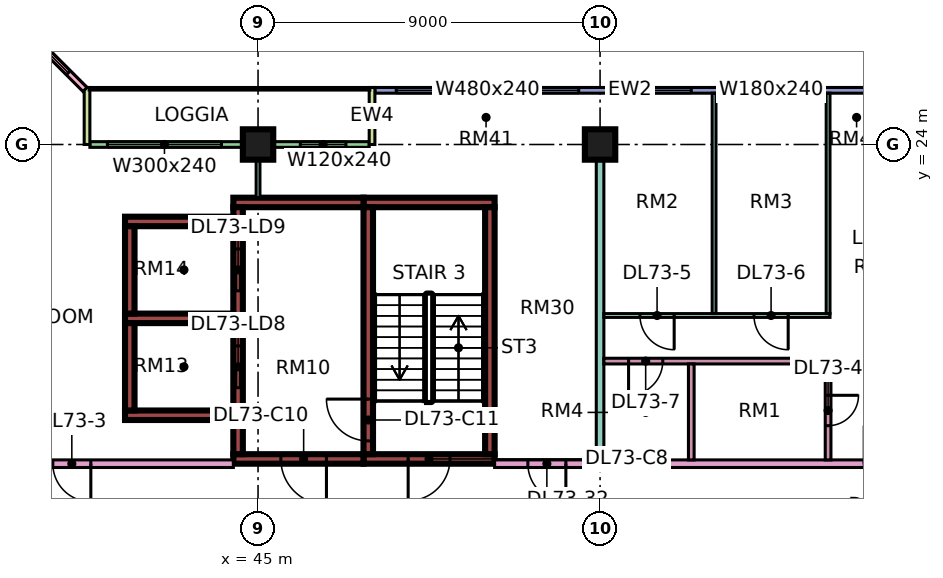
"""IFC4 building model, lengths in metres.
Left out: names, types, materials, properties, quantities, classifications, styles, units other than length and angle.
Written with IfcOpenShell. Run it as: python <this file> out.ifc"""

import sys

from ifc_helpers import new_model, si_unit, direction, frame, frame_2d, origin, origin_2d, place, context, subcontext, project, spatial, rectangle, extrude, element, fill, save


model = new_model("IFC4")
c1 = context("Model", 3, precision=1e-05, world=origin(), true_north=direction((0.0, 1.0)))
c2 = subcontext(c1, "Body", "Model", "MODEL_VIEW")
j1 = project(units=[si_unit("LENGTHUNIT", "METRE"), si_unit("PLANEANGLEUNIT", "RADIAN")], contexts=[c1])
p1 = place(None, origin())
s1 = spatial("IfcSite", under=j1, at=p1, CompositionType="ELEMENT")
p2 = place(p1, origin())
s2 = spatial("IfcBuilding", under=s1, at=p2, CompositionType="ELEMENT")
p3 = place(p2, frame((0.0, 0.0, 310.9)))
s3 = spatial("IfcBuildingStorey", under=s2, at=p3, CompositionType="ELEMENT", Elevation=310.9)
for number, where, z_axis, x_axis in (
    (1, (45.0, 24.0, 0.0), (0.0, 0.0, 1.0), (1.0, 0.0, 0.0)),
    (2, (54.0, 24.0, 0.0), (0.0, 0.0, 1.0), (1.0, 0.0, 0.0)),
):
    element("IfcColumn", number, at=place(p3, frame(where, z_axis=z_axis, x_axis=x_axis)), inside=s3, PredefinedType="COLUMN", context=c2, shape_type="SweptSolid", body=[
        extrude(rectangle(XDim=0.8, YDim=0.8, at=origin_2d()), origin(), (0.0, 0.0, 1.0), 3.75),
    ])
p4 = place(p3, frame((47.775, 15.725, 0.0), z_axis=(0.0, 0.0, 1.0), x_axis=(1.0, 0.0, 0.0)))
e3 = element("IfcWall", 3, at=p4, inside=s3, PredefinedType="SHEAR", context=c2, shape_type="SweptSolid", body=[
    extrude(rectangle(XDim=3.45, YDim=0.25, at=frame_2d((1.725, 0.0))), origin(), (0.0, 0.0, 1.0), 3.75),
])
p5 = place(p4, frame((1.175, 0.0, 0.0)))
e4 = element("IfcOpeningElement", 4, at=p5, cuts=e3, PredefinedType="OPENING", context=c2, shape_type="SweptSolid", body=[
    extrude(rectangle(XDim=1.1, YDim=2.2, at=frame_2d((0.55, 1.1))), frame((0.0, 0.135, 0.0), z_axis=(0.0, -1.0, 0.0), x_axis=(1.0, 0.0, 0.0)), (0.0, 0.0, 1.0), 0.27),
])
p6 = place(p3, frame((47.775, 22.475, 0.0), z_axis=(0.0, 0.0, 1.0), x_axis=(1.0, 0.0, 0.0)))
e5 = element("IfcWall", 5, at=p6, inside=s3, PredefinedType="SHEAR", context=c2, shape_type="SweptSolid", body=[
    extrude(rectangle(XDim=3.45, YDim=0.25, at=frame_2d((1.725, 0.0))), origin(), (0.0, 0.0, 1.0), 3.75),
])
p7 = place(p3, frame((47.9, 15.85, 0.0), z_axis=(0.0, 0.0, 1.0), x_axis=(0.0, 1.0, 0.0)))
e6 = element("IfcWall", 6, at=p7, inside=s3, PredefinedType="SHEAR", context=c2, shape_type="SweptSolid", body=[
    extrude(rectangle(XDim=6.5, YDim=0.25, at=frame_2d((3.25, 0.0))), origin(), (0.0, 0.0, 1.0), 3.75),
])
p8 = place(p7, frame((0.35, 0.0, 0.0)))
e7 = element("IfcOpeningElement", 7, at=p8, cuts=e6, PredefinedType="OPENING", context=c2, shape_type="SweptSolid", body=[
    extrude(rectangle(XDim=1.1, YDim=2.2, at=frame_2d((0.55, 1.1))), frame((0.0, 0.135, 0.0), z_axis=(0.0, -1.0, 0.0), x_axis=(1.0, 0.0, 0.0)), (0.0, 0.0, 1.0), 0.27),
])
p9 = place(p3, frame((51.1, 15.85, 0.0), z_axis=(0.0, 0.0, 1.0), x_axis=(0.0, 1.0, 0.0)))
e8 = element("IfcWall", 8, at=p9, inside=s3, PredefinedType="SHEAR", context=c2, shape_type="SweptSolid", body=[
    extrude(rectangle(XDim=6.5, YDim=0.25, at=frame_2d((3.25, 0.0))), origin(), (0.0, 0.0, 1.0), 3.75),
])
p10 = place(p3, frame((44.35, 15.725, 0.0), z_axis=(0.0, 0.0, 1.0), x_axis=(1.0, 0.0, 0.0)))
e9 = element("IfcWall", 9, at=p10, inside=s3, PredefinedType="SHEAR", context=c2, shape_type="SweptSolid", body=[
    extrude(rectangle(XDim=3.425, YDim=0.25, at=frame_2d((1.712, 0.0))), origin(), (0.0, 0.0, 1.0), 3.75),
])
p11 = place(p10, frame((1.25, 0.0, 0.0)))
e10 = element("IfcOpeningElement", 10, at=p11, cuts=e9, PredefinedType="OPENING", context=c2, shape_type="SweptSolid", body=[
    extrude(rectangle(XDim=1.2, YDim=2.2, at=frame_2d((0.6, 1.1))), frame((0.0, 0.135, 0.0), z_axis=(0.0, -1.0, 0.0), x_axis=(1.0, 0.0, 0.0)), (0.0, 0.0, 1.0), 0.27),
])
p12 = place(p3, frame((44.35, 22.475, 0.0), z_axis=(0.0, 0.0, 1.0), x_axis=(1.0, 0.0, 0.0)))
e11 = element("IfcWall", 11, at=p12, inside=s3, PredefinedType="SHEAR", context=c2, shape_type="SweptSolid", body=[
    extrude(rectangle(XDim=3.425, YDim=0.25, at=frame_2d((1.712, 0.0))), origin(), (0.0, 0.0, 1.0), 3.75),
])
p13 = place(p3, frame((44.475, 15.85, 0.0), z_axis=(0.0, 0.0, 1.0), x_axis=(0.0, 1.0, 0.0)))
e12 = element("IfcWall", 12, at=p13, inside=s3, PredefinedType="SHEAR", context=c2, shape_type="SweptSolid", body=[
    extrude(rectangle(XDim=6.5, YDim=0.25, at=frame_2d((3.25, 0.0))), origin(), (0.0, 0.0, 1.0), 3.75),
])
p14 = place(p13, frame((1.75, 0.0, 0.0)))
e13 = element("IfcOpeningElement", 13, at=p14, cuts=e12, PredefinedType="OPENING", context=c2, shape_type="SweptSolid", body=[
    extrude(rectangle(XDim=1.1, YDim=2.2, at=frame_2d((0.55, 1.1))), frame((0.0, 0.135, 0.0), z_axis=(0.0, -1.0, 0.0), x_axis=(1.0, 0.0, 0.0)), (0.0, 0.0, 1.0), 0.27),
])
p15 = place(p13, frame((4.3, 0.0, 0.0)))
e14 = element("IfcOpeningElement", 14, at=p15, cuts=e12, PredefinedType="OPENING", context=c2, shape_type="SweptSolid", body=[
    extrude(rectangle(XDim=1.1, YDim=2.2, at=frame_2d((0.55, 1.1))), frame((0.0, 0.135, 0.0), z_axis=(0.0, -1.0, 0.0), x_axis=(1.0, 0.0, 0.0)), (0.0, 0.0, 1.0), 0.27),
])
for number, where, z_axis, x_axis in (
    (15, (41.5, 16.875, 0.0), (0.0, 0.0, 1.0), (1.0, 0.0, 0.0)),
    (16, (41.5, 19.425, 0.0), (0.0, 0.0, 1.0), (1.0, 0.0, 0.0)),
    (17, (41.5, 21.975, 0.0), (0.0, 0.0, 1.0), (1.0, 0.0, 0.0)),
):
    element("IfcWall", number, at=place(p3, frame(where, z_axis=z_axis, x_axis=x_axis)), inside=s3, PredefinedType="SHEAR", context=c2, shape_type="SweptSolid", body=[
        extrude(rectangle(XDim=2.85, YDim=0.25, at=frame_2d((1.425, 0.0))), origin(), (0.0, 0.0, 1.0), 3.75),
    ])
for number, where, z_axis, x_axis in (
    (18, (41.625, 17.0, 0.0), (0.0, 0.0, 1.0), (0.0, 1.0, 0.0)),
    (19, (41.625, 19.55, 0.0), (0.0, 0.0, 1.0), (0.0, 1.0, 0.0)),
):
    element("IfcWall", number, at=place(p3, frame(where, z_axis=z_axis, x_axis=x_axis)), inside=s3, PredefinedType="SHEAR", context=c2, shape_type="SweptSolid", body=[
        extrude(rectangle(XDim=2.3, YDim=0.25, at=frame_2d((1.15, 0.0))), origin(), (0.0, 0.0, 1.0), 3.75),
    ])
p16 = place(p3, frame((61.5, 25.425, 0.0), z_axis=(0.0, 0.0, 1.0), x_axis=(-1.0, 0.0, 0.0)))
e20 = element("IfcWall", 20, at=p16, inside=s3, PredefinedType="SOLIDWALL", context=c2, shape_type="SweptSolid", body=[
    extrude(rectangle(XDim=13.425, YDim=0.15, at=frame_2d((6.712, 0.0))), origin(), (0.0, 0.0, 1.0), 3.35),
])
p17 = place(p16, frame((2.1, 0.0, 0.45)))
e21 = element("IfcOpeningElement", 21, at=p17, cuts=e20, PredefinedType="OPENING", context=c2, shape_type="SweptSolid", body=[
    extrude(rectangle(XDim=1.8, YDim=2.4, at=frame_2d((0.9, 1.2))), frame((0.0, 0.085, 0.0), z_axis=(0.0, -1.0, 0.0), x_axis=(1.0, 0.0, 0.0)), (0.0, 0.0, 1.0), 0.17),
])
p18 = place(p16, frame((5.1, 0.0, 0.45)))
e22 = element("IfcOpeningElement", 22, at=p18, cuts=e20, PredefinedType="OPENING", context=c2, shape_type="SweptSolid", body=[
    extrude(rectangle(XDim=1.8, YDim=2.4, at=frame_2d((0.9, 1.2))), frame((0.0, 0.085, 0.0), z_axis=(0.0, -1.0, 0.0), x_axis=(1.0, 0.0, 0.0)), (0.0, 0.0, 1.0), 0.17),
])
p19 = place(p16, frame((8.062, 0.0, 0.45)))
e23 = element("IfcOpeningElement", 23, at=p19, cuts=e20, PredefinedType="OPENING", context=c2, shape_type="SweptSolid", body=[
    extrude(rectangle(XDim=4.8, YDim=2.4, at=frame_2d((2.4, 1.2))), frame((0.0, 0.085, 0.0), z_axis=(0.0, -1.0, 0.0), x_axis=(1.0, 0.0, 0.0)), (0.0, 0.0, 1.0), 0.17),
])
p20 = place(p3, frame((47.925, 24.0, 0.0), z_axis=(0.0, 0.0, 1.0), x_axis=(-1.0, 0.0, 0.0)))
e24 = element("IfcWall", 24, at=p20, inside=s3, PredefinedType="SOLIDWALL", context=c2, shape_type="SweptSolid", body=[
    extrude(rectangle(XDim=7.35, YDim=0.15, at=frame_2d((3.675, 0.0))), origin(), (0.0, 0.0, 1.0), 3.35),
])
p21 = place(p20, frame((0.613, 0.0, 0.45)))
e25 = element("IfcOpeningElement", 25, at=p21, cuts=e24, PredefinedType="OPENING", context=c2, shape_type="SweptSolid", body=[
    extrude(rectangle(XDim=1.2, YDim=2.4, at=frame_2d((0.6, 1.2))), frame((0.0, 0.085, 0.0), z_axis=(0.0, -1.0, 0.0), x_axis=(1.0, 0.0, 0.0)), (0.0, 0.0, 1.0), 0.17),
])
p22 = place(p20, frame((3.887, 0.0, 0.45)))
e26 = element("IfcOpeningElement", 26, at=p22, cuts=e24, PredefinedType="OPENING", context=c2, shape_type="SweptSolid", body=[
    extrude(rectangle(XDim=3.0, YDim=2.4, at=frame_2d((1.5, 1.2))), frame((0.0, 0.085, 0.0), z_axis=(0.0, -1.0, 0.0), x_axis=(1.0, 0.0, 0.0)), (0.0, 0.0, 1.0), 0.17),
])
for number, where, z_axis, x_axis in (
    (27, (48.0, 25.5, 0.0), (0.0, 0.0, 1.0), (0.0, -1.0, 0.0)),
    (28, (40.5, 25.5, 0.0), (0.0, 0.0, 1.0), (0.0, -1.0, 0.0)),
):
    element("IfcWall", number, at=place(p3, frame(where, z_axis=z_axis, x_axis=x_axis)), inside=s3, PredefinedType="SOLIDWALL", context=c2, shape_type="SweptSolid", body=[
        extrude(rectangle(XDim=1.5, YDim=0.15, at=frame_2d((0.75, 0.0))), origin(), (0.0, 0.0, 1.0), 3.35),
    ])
p23 = place(p3, frame((40.447, 25.447, 0.0), z_axis=(0.0, 0.0, 1.0), x_axis=(-0.707106781187, 0.707106781187, 0.0)))
e29 = element("IfcWall", 29, at=p23, inside=s3, PredefinedType="SOLIDWALL", context=c2, shape_type="SweptSolid", body=[
    extrude(rectangle(XDim=4.243, YDim=0.15, at=frame_2d((2.121, 0.0))), origin(), (0.0, 0.0, 1.0), 3.35),
])
p24 = place(p23, frame((0.621, 0.0, 0.45)))
e30 = element("IfcOpeningElement", 30, at=p24, cuts=e29, PredefinedType="OPENING", context=c2, shape_type="SweptSolid", body=[
    extrude(rectangle(XDim=3.0, YDim=2.4, at=frame_2d((1.5, 1.2))), frame((0.0, 0.085, 0.0), z_axis=(0.0, -1.0, 0.0), x_axis=(1.0, 0.0, 0.0)), (0.0, 0.0, 1.0), 0.17),
])
p25 = place(p3, frame((34.0, 15.6, 0.0), z_axis=(0.0, 0.0, 1.0), x_axis=(1.0, 0.0, 0.0)))
e31 = element("IfcWall", 31, at=p25, inside=s3, PredefinedType="PARTITIONING", context=c2, shape_type="SweptSolid", body=[
    extrude(rectangle(XDim=10.35, YDim=0.2, at=frame_2d((5.175, 0.0))), origin(), (0.0, 0.0, 1.0), 3.35),
])
p26 = place(p25, frame((5.6, 0.0, 0.0)))
e32 = element("IfcOpeningElement", 32, at=p26, cuts=e31, PredefinedType="OPENING", context=c2, shape_type="SweptSolid", body=[
    extrude(rectangle(XDim=1.0, YDim=2.1, at=frame_2d((0.5, 1.05))), frame((0.0, 0.11, 0.0), z_axis=(0.0, -1.0, 0.0), x_axis=(1.0, 0.0, 0.0)), (0.0, 0.0, 1.0), 0.22),
])
p27 = place(p25, frame((0.45, 0.0, 0.0)))
e33 = element("IfcOpeningElement", 33, at=p27, cuts=e31, PredefinedType="OPENING", context=c2, shape_type="SweptSolid", body=[
    extrude(rectangle(XDim=1.2, YDim=2.1, at=frame_2d((0.6, 1.05))), frame((0.0, 0.11, 0.0), z_axis=(0.0, -1.0, 0.0), x_axis=(1.0, 0.0, 0.0)), (0.0, 0.0, 1.0), 0.22),
])
p28 = place(p3, frame((45.0, 22.6, 0.0), z_axis=(0.0, 0.0, 1.0), x_axis=(0.0, 1.0, 0.0)))
e34 = element("IfcWall", 34, at=p28, inside=s3, PredefinedType="PARTITIONING", context=c2, shape_type="SweptSolid", body=[
    extrude(rectangle(XDim=1.326, YDim=0.1, at=frame_2d((0.663, 0.0))), origin(), (0.0, 0.0, 1.0), 3.35),
])
p29 = place(p3, frame((51.225, 15.6, 0.0), z_axis=(0.0, 0.0, 1.0), x_axis=(1.0, 0.0, 0.0)))
e35 = element("IfcWall", 35, at=p29, inside=s3, PredefinedType="PARTITIONING", context=c2, shape_type="SweptSolid", body=[
    extrude(rectangle(XDim=11.701, YDim=0.2, at=frame_2d((5.851, 0.0))), origin(), (0.0, 0.0, 1.0), 3.35),
])
p30 = place(p29, frame((9.725, 0.0, 0.0)))
e36 = element("IfcOpeningElement", 36, at=p30, cuts=e35, PredefinedType="OPENING", context=c2, shape_type="SweptSolid", body=[
    extrude(rectangle(XDim=1.0, YDim=2.1, at=frame_2d((0.5, 1.05))), frame((0.0, 0.11, 0.0), z_axis=(0.0, -1.0, 0.0), x_axis=(1.0, 0.0, 0.0)), (0.0, 0.0, 1.0), 0.22),
])
p31 = place(p29, frame((0.875, 0.0, 0.0)))
e37 = element("IfcOpeningElement", 37, at=p31, cuts=e35, PredefinedType="OPENING", context=c2, shape_type="SweptSolid", body=[
    extrude(rectangle(XDim=1.0, YDim=2.1, at=frame_2d((0.5, 1.05))), frame((0.0, 0.11, 0.0), z_axis=(0.0, -1.0, 0.0), x_axis=(1.0, 0.0, 0.0)), (0.0, 0.0, 1.0), 0.22),
])
p32 = place(p3, frame((54.0, 15.7, 0.0), z_axis=(0.0, 0.0, 1.0), x_axis=(0.0, 1.0, 0.0)))
e38 = element("IfcWall", 38, at=p32, inside=s3, PredefinedType="PARTITIONING", context=c2, shape_type="SweptSolid", body=[
    extrude(rectangle(XDim=8.3, YDim=0.2, at=frame_2d((4.15, 0.0))), origin(), (0.0, 0.0, 1.0), 3.35),
])
p33 = place(p3, frame((54.1, 18.3, 0.0), z_axis=(0.0, 0.0, 1.0), x_axis=(1.0, 0.0, 0.0)))
e39 = element("IfcWall", 39, at=p33, inside=s3, PredefinedType="PARTITIONING", context=c2, shape_type="SweptSolid", body=[
    extrude(rectangle(XDim=5.975, YDim=0.15, at=frame_2d((2.987, 0.0))), origin(), (0.0, 0.0, 1.0), 3.35),
])
p34 = place(p33, frame((0.65, 0.0, 0.0)))
e40 = element("IfcOpeningElement", 40, at=p34, cuts=e39, PredefinedType="OPENING", context=c2, shape_type="SweptSolid", body=[
    extrude(rectangle(XDim=0.9, YDim=2.1, at=frame_2d((0.45, 1.05))), frame((0.0, 0.085, 0.0), z_axis=(0.0, -1.0, 0.0), x_axis=(1.0, 0.0, 0.0)), (0.0, 0.0, 1.0), 0.17),
])
p35 = place(p3, frame((54.1, 19.5, 0.0), z_axis=(0.0, 0.0, 1.0), x_axis=(1.0, 0.0, 0.0)))
e41 = element("IfcWall", 41, at=p35, inside=s3, PredefinedType="PARTITIONING", context=c2, shape_type="SweptSolid", body=[
    extrude(rectangle(XDim=5.95, YDim=0.1, at=frame_2d((2.975, 0.0))), origin(), (0.0, 0.0, 1.0), 3.35),
])
p36 = place(p35, frame((0.95, 0.0, 0.0)))
e42 = element("IfcOpeningElement", 42, at=p36, cuts=e41, PredefinedType="OPENING", context=c2, shape_type="SweptSolid", body=[
    extrude(rectangle(XDim=0.9, YDim=2.1, at=frame_2d((0.45, 1.05))), frame((0.0, 0.06, 0.0), z_axis=(0.0, -1.0, 0.0), x_axis=(1.0, 0.0, 0.0)), (0.0, 0.0, 1.0), 0.12),
])
p37 = place(p35, frame((3.95, 0.0, 0.0)))
e43 = element("IfcOpeningElement", 43, at=p37, cuts=e41, PredefinedType="OPENING", context=c2, shape_type="SweptSolid", body=[
    extrude(rectangle(XDim=0.9, YDim=2.1, at=frame_2d((0.45, 1.05))), frame((0.0, 0.06, 0.0), z_axis=(0.0, -1.0, 0.0), x_axis=(1.0, 0.0, 0.0)), (0.0, 0.0, 1.0), 0.12),
])
p38 = place(p3, frame((56.4, 15.7, 0.0), z_axis=(0.0, 0.0, 1.0), x_axis=(0.0, 1.0, 0.0)))
e44 = element("IfcWall", 44, at=p38, inside=s3, PredefinedType="PARTITIONING", context=c2, shape_type="SweptSolid", body=[
    extrude(rectangle(XDim=2.525, YDim=0.15, at=frame_2d((1.263, 0.0))), origin(), (0.0, 0.0, 1.0), 3.35),
])
p39 = place(p3, frame((57.0, 19.55, 0.0), z_axis=(0.0, 0.0, 1.0), x_axis=(0.0, 1.0, 0.0)))
e45 = element("IfcWall", 45, at=p39, inside=s3, PredefinedType="PARTITIONING", context=c2, shape_type="SweptSolid", body=[
    extrude(rectangle(XDim=5.801, YDim=0.1, at=frame_2d((2.9, 0.0))), origin(), (0.0, 0.0, 1.0), 3.35),
])
p40 = place(p3, frame((60.0, 15.7, 0.0), z_axis=(0.0, 0.0, 1.0), x_axis=(0.0, 1.0, 0.0)))
e46 = element("IfcWall", 46, at=p40, inside=s3, PredefinedType="PARTITIONING", context=c2, shape_type="SweptSolid", body=[
    extrude(rectangle(XDim=2.525, YDim=0.15, at=frame_2d((1.263, 0.0))), origin(), (0.0, 0.0, 1.0), 3.35),
])
p41 = place(p40, frame((0.9, 0.0, 0.0)))
e47 = element("IfcOpeningElement", 47, at=p41, cuts=e46, PredefinedType="OPENING", context=c2, shape_type="SweptSolid", body=[
    extrude(rectangle(XDim=0.8, YDim=2.1, at=frame_2d((0.4, 1.05))), frame((0.0, 0.085, 0.0), z_axis=(0.0, -1.0, 0.0), x_axis=(1.0, 0.0, 0.0)), (0.0, 0.0, 1.0), 0.17),
])
p42 = place(p3, frame((60.0, 19.55, 0.0), z_axis=(0.0, 0.0, 1.0), x_axis=(0.0, 1.0, 0.0)))
e48 = element("IfcWall", 48, at=p42, inside=s3, PredefinedType="PARTITIONING", context=c2, shape_type="SweptSolid", body=[
    extrude(rectangle(XDim=5.8, YDim=0.1, at=frame_2d((2.9, 0.0))), origin(), (0.0, 0.0, 1.0), 3.35),
])
p43 = place(p17, origin())
e49 = element("IfcWindow", 49, at=p43, inside=s3, PartitioningType="SINGLE_PANEL", PredefinedType="WINDOW", context=c2, shape_type="SweptSolid", body=[
    extrude(rectangle(XDim=1.8, YDim=2.4, at=frame_2d((0.9, 1.2))), frame((0.0, 0.03, 0.0), z_axis=(0.0, -1.0, 0.0), x_axis=(1.0, 0.0, 0.0)), (0.0, 0.0, 1.0), 0.06),
])
fill(e21, e49)
p44 = place(p18, origin())
e50 = element("IfcWindow", 50, at=p44, inside=s3, PartitioningType="SINGLE_PANEL", PredefinedType="WINDOW", context=c2, shape_type="SweptSolid", body=[
    extrude(rectangle(XDim=1.8, YDim=2.4, at=frame_2d((0.9, 1.2))), frame((0.0, 0.03, 0.0), z_axis=(0.0, -1.0, 0.0), x_axis=(1.0, 0.0, 0.0)), (0.0, 0.0, 1.0), 0.06),
])
fill(e22, e50)
p45 = place(p19, origin())
e51 = element("IfcWindow", 51, at=p45, inside=s3, PartitioningType="SINGLE_PANEL", PredefinedType="WINDOW", context=c2, shape_type="SweptSolid", body=[
    extrude(rectangle(XDim=4.8, YDim=2.4, at=frame_2d((2.4, 1.2))), frame((0.0, 0.03, 0.0), z_axis=(0.0, -1.0, 0.0), x_axis=(1.0, 0.0, 0.0)), (0.0, 0.0, 1.0), 0.06),
])
fill(e23, e51)
p46 = place(p21, origin())
e52 = element("IfcWindow", 52, at=p46, inside=s3, PartitioningType="SINGLE_PANEL", PredefinedType="WINDOW", context=c2, shape_type="SweptSolid", body=[
    extrude(rectangle(XDim=1.2, YDim=2.4, at=frame_2d((0.6, 1.2))), frame((0.0, 0.03, 0.0), z_axis=(0.0, -1.0, 0.0), x_axis=(1.0, 0.0, 0.0)), (0.0, 0.0, 1.0), 0.06),
])
fill(e25, e52)
p47 = place(p22, origin())
e53 = element("IfcWindow", 53, at=p47, inside=s3, PartitioningType="SINGLE_PANEL", PredefinedType="WINDOW", context=c2, shape_type="SweptSolid", body=[
    extrude(rectangle(XDim=3.0, YDim=2.4, at=frame_2d((1.5, 1.2))), frame((0.0, 0.03, 0.0), z_axis=(0.0, -1.0, 0.0), x_axis=(1.0, 0.0, 0.0)), (0.0, 0.0, 1.0), 0.06),
])
fill(e26, e53)
p48 = place(p24, origin())
e54 = element("IfcWindow", 54, at=p48, inside=s3, PartitioningType="SINGLE_PANEL", PredefinedType="WINDOW", context=c2, shape_type="SweptSolid", body=[
    extrude(rectangle(XDim=3.0, YDim=2.4, at=frame_2d((1.5, 1.2))), frame((0.0, 0.03, 0.0), z_axis=(0.0, -1.0, 0.0), x_axis=(1.0, 0.0, 0.0)), (0.0, 0.0, 1.0), 0.06),
])
fill(e30, e54)
p49 = place(p5, frame((1.1, 0.0, 0.0), z_axis=(0.0, 0.0, 1.0), x_axis=(-1.0, 0.0, 0.0)))
e55 = element("IfcDoor", 55, at=p49, inside=s3, OperationType="SINGLE_SWING_LEFT", PredefinedType="DOOR", context=c2, shape_type="SweptSolid", body=[
    extrude(rectangle(XDim=1.1, YDim=2.2, at=frame_2d((0.55, 1.1))), frame((0.0, 0.025, 0.0), z_axis=(0.0, -1.0, 0.0), x_axis=(1.0, 0.0, 0.0)), (0.0, 0.0, 1.0), 0.05),
])
fill(e4, e55)
p50 = place(p11, origin())
e56 = element("IfcDoor", 56, at=p50, inside=s3, OperationType="SINGLE_SWING_RIGHT", PredefinedType="DOOR", context=c2, shape_type="SweptSolid", body=[
    extrude(rectangle(XDim=1.2, YDim=2.2, at=frame_2d((0.6, 1.1))), frame((0.0, 0.025, 0.0), z_axis=(0.0, -1.0, 0.0), x_axis=(1.0, 0.0, 0.0)), (0.0, 0.0, 1.0), 0.05),
])
fill(e10, e56)
p51 = place(p8, frame((1.1, 0.0, 0.0), z_axis=(0.0, 0.0, 1.0), x_axis=(-1.0, 0.0, 0.0)))
e57 = element("IfcDoor", 57, at=p51, inside=s3, OperationType="SINGLE_SWING_RIGHT", PredefinedType="DOOR", context=c2, shape_type="SweptSolid", body=[
    extrude(rectangle(XDim=1.1, YDim=2.2, at=frame_2d((0.55, 1.1))), frame((0.0, 0.025, 0.0), z_axis=(0.0, -1.0, 0.0), x_axis=(1.0, 0.0, 0.0)), (0.0, 0.0, 1.0), 0.05),
])
fill(e7, e57)
p52 = place(p14, origin())
e58 = element("IfcDoor", 58, at=p52, inside=s3, OperationType="DOUBLE_DOOR_SLIDING", PredefinedType="DOOR", context=c2, shape_type="SweptSolid", body=[
    extrude(rectangle(XDim=1.1, YDim=2.2, at=frame_2d((0.55, 1.1))), frame((0.0, 0.025, 0.0), z_axis=(0.0, -1.0, 0.0), x_axis=(1.0, 0.0, 0.0)), (0.0, 0.0, 1.0), 0.05),
])
fill(e13, e58)
p53 = place(p15, origin())
e59 = element("IfcDoor", 59, at=p53, inside=s3, OperationType="DOUBLE_DOOR_SLIDING", PredefinedType="DOOR", context=c2, shape_type="SweptSolid", body=[
    extrude(rectangle(XDim=1.1, YDim=2.2, at=frame_2d((0.55, 1.1))), frame((0.0, 0.025, 0.0), z_axis=(0.0, -1.0, 0.0), x_axis=(1.0, 0.0, 0.0)), (0.0, 0.0, 1.0), 0.05),
])
fill(e14, e59)
p54 = place(p26, origin())
e60 = element("IfcDoor", 60, at=p54, inside=s3, OperationType="SINGLE_SWING_RIGHT", PredefinedType="DOOR", context=c2, shape_type="SweptSolid", body=[
    extrude(rectangle(XDim=1.0, YDim=2.1, at=frame_2d((0.5, 1.05))), frame((0.0, 0.025, 0.0), z_axis=(0.0, -1.0, 0.0), x_axis=(1.0, 0.0, 0.0)), (0.0, 0.0, 1.0), 0.05),
])
fill(e32, e60)
p55 = place(p41, origin())
e61 = element("IfcDoor", 61, at=p55, inside=s3, OperationType="SINGLE_SWING_RIGHT", PredefinedType="DOOR", context=c2, shape_type="SweptSolid", body=[
    extrude(rectangle(XDim=0.8, YDim=2.1, at=frame_2d((0.4, 1.05))), frame((0.0, 0.025, 0.0), z_axis=(0.0, -1.0, 0.0), x_axis=(1.0, 0.0, 0.0)), (0.0, 0.0, 1.0), 0.05),
])
fill(e47, e61)
p56 = place(p36, origin())
e62 = element("IfcDoor", 62, at=p56, inside=s3, OperationType="SINGLE_SWING_RIGHT", PredefinedType="DOOR", context=c2, shape_type="SweptSolid", body=[
    extrude(rectangle(XDim=0.9, YDim=2.1, at=frame_2d((0.45, 1.05))), frame((0.0, 0.025, 0.0), z_axis=(0.0, -1.0, 0.0), x_axis=(1.0, 0.0, 0.0)), (0.0, 0.0, 1.0), 0.05),
])
fill(e42, e62)
p57 = place(p37, origin())
e63 = element("IfcDoor", 63, at=p57, inside=s3, OperationType="SINGLE_SWING_RIGHT", PredefinedType="DOOR", context=c2, shape_type="SweptSolid", body=[
    extrude(rectangle(XDim=0.9, YDim=2.1, at=frame_2d((0.45, 1.05))), frame((0.0, 0.025, 0.0), z_axis=(0.0, -1.0, 0.0), x_axis=(1.0, 0.0, 0.0)), (0.0, 0.0, 1.0), 0.05),
])
fill(e43, e63)
p58 = place(p34, frame((0.9, 0.0, 0.0), z_axis=(0.0, 0.0, 1.0), x_axis=(-1.0, 0.0, 0.0)))
e64 = element("IfcDoor", 64, at=p58, inside=s3, OperationType="SINGLE_SWING_LEFT", PredefinedType="DOOR", context=c2, shape_type="SweptSolid", body=[
    extrude(rectangle(XDim=0.9, YDim=2.1, at=frame_2d((0.45, 1.05))), frame((0.0, 0.025, 0.0), z_axis=(0.0, -1.0, 0.0), x_axis=(1.0, 0.0, 0.0)), (0.0, 0.0, 1.0), 0.05),
])
fill(e40, e64)
p59 = place(p31, origin())
e65 = element("IfcDoor", 65, at=p59, inside=s3, OperationType="SINGLE_SWING_RIGHT", PredefinedType="DOOR", context=c2, shape_type="SweptSolid", body=[
    extrude(rectangle(XDim=1.0, YDim=2.1, at=frame_2d((0.5, 1.05))), frame((0.0, 0.025, 0.0), z_axis=(0.0, -1.0, 0.0), x_axis=(1.0, 0.0, 0.0)), (0.0, 0.0, 1.0), 0.05),
])
fill(e37, e65)
save(model, sys.argv[1])
